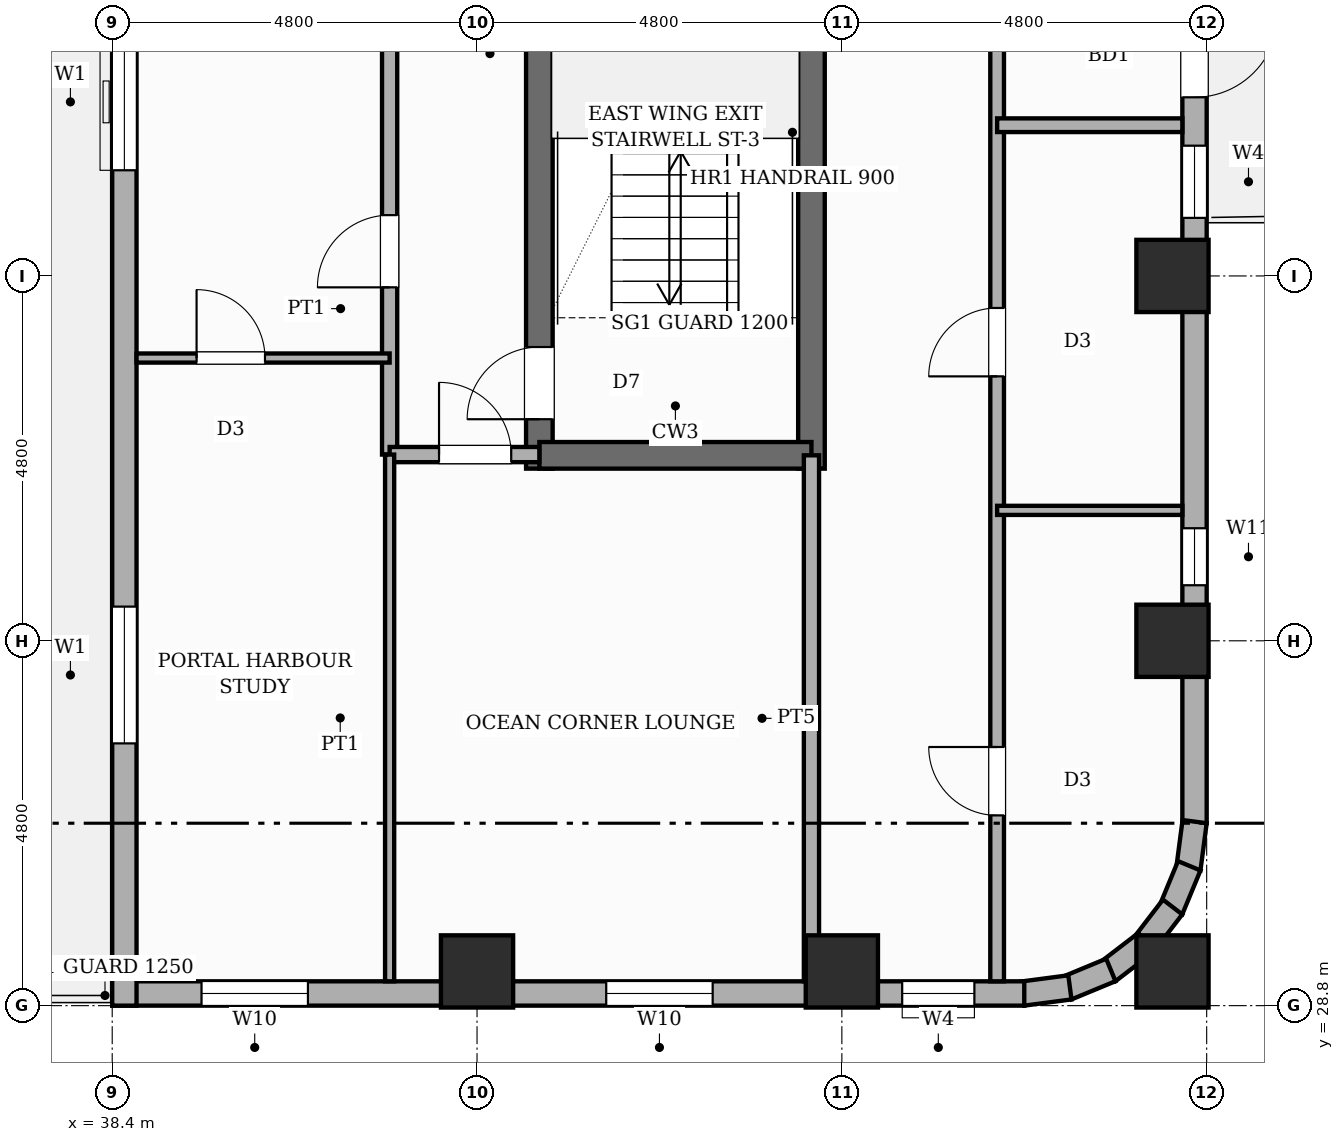
"""IFC4 building model, lengths in metres.
Left out: names, types, materials, properties, quantities, classifications, styles, units other than length and angle.
Written with IfcOpenShell. Run it as: python <this file> out.ifc"""

import sys

from ifc_helpers import new_model, si_unit, direction, frame, frame_2d, origin, origin_2d, place, context, subcontext, project, spatial, rectangle, extrude, element, fill, save


model = new_model("IFC4")
c1 = context("Model", 3, precision=1e-05, world=origin(), true_north=direction((0.0, 1.0)))
c2 = subcontext(c1, "Body", "Model", "MODEL_VIEW")
j1 = project(units=[si_unit("LENGTHUNIT", "METRE"), si_unit("PLANEANGLEUNIT", "RADIAN")], contexts=[c1])
p1 = place(None, origin())
s1 = spatial("IfcSite", under=j1, at=p1, CompositionType="ELEMENT")
p2 = place(p1, origin())
s2 = spatial("IfcBuilding", under=s1, at=p2, CompositionType="ELEMENT")
p3 = place(p2, frame((0.0, 0.0, 154.0)))
s3 = spatial("IfcBuildingStorey", under=s2, at=p3, CompositionType="ELEMENT", Elevation=154.0)
p4 = place(p3, frame((44.02, 35.865, 0.0), z_axis=(0.0, 0.0, 1.0), x_axis=(0.0, 1.0, 0.0)))
e1 = element("IfcWall", 1, at=p4, inside=s3, PredefinedType="SHEAR", context=c2, shape_type="SweptSolid", body=[
    extrude(rectangle(XDim=8.97, YDim=0.35, at=frame_2d((4.485, 0.0))), origin(), (0.0, 0.0, 1.0), 3.6),
])
p5 = place(p4, frame((0.65, 0.0, 0.0)))
e2 = element("IfcOpeningElement", 2, at=p5, cuts=e1, PredefinedType="OPENING", context=c2, shape_type="SweptSolid", body=[
    extrude(rectangle(XDim=0.95, YDim=2.1, at=frame_2d((0.475, 1.05))), frame((0.0, 0.185, 0.0), z_axis=(0.0, -1.0, 0.0), x_axis=(1.0, 0.0, 0.0)), (0.0, 0.0, 1.0), 0.37),
])
p6 = place(p3, frame((47.6, 35.865, 0.0), z_axis=(0.0, 0.0, 1.0), x_axis=(0.0, 1.0, 0.0)))
e3 = element("IfcWall", 3, at=p6, inside=s3, PredefinedType="SHEAR", context=c2, shape_type="SweptSolid", body=[
    extrude(rectangle(XDim=8.97, YDim=0.35, at=frame_2d((4.485, 0.0))), origin(), (0.0, 0.0, 1.0), 3.6),
])
p7 = place(p3, frame((44.02, 36.04, 0.0), z_axis=(0.0, 0.0, 1.0), x_axis=(1.0, 0.0, 0.0)))
e4 = element("IfcWall", 4, at=p7, inside=s3, PredefinedType="SHEAR", context=c2, shape_type="SweptSolid", body=[
    extrude(rectangle(XDim=3.58, YDim=0.35, at=frame_2d((1.79, 0.0))), origin(), (0.0, 0.0, 1.0), 3.6),
])
for number, where, z_axis, x_axis in (
    (5, (43.2, 29.25, 0.0), (0.0, 0.0, 1.0), (1.0, 0.0, 0.0)),
    (6, (48.0, 29.25, 0.0), (0.0, 0.0, 1.0), (1.0, 0.0, 0.0)),
    (7, (52.35, 29.25, 0.0), (0.0, 0.0, 1.0), (1.0, 0.0, 0.0)),
    (8, (52.35, 33.6, 0.0), (0.0, 0.0, 1.0), (1.0, 0.0, 0.0)),
    (9, (52.35, 38.4, 0.0), (0.0, 0.0, 1.0), (1.0, 0.0, 0.0)),
):
    element("IfcColumn", number, at=place(p3, frame(where, z_axis=z_axis, x_axis=x_axis)), inside=s3, PredefinedType="COLUMN", context=c2, shape_type="SweptSolid", body=[
        extrude(rectangle(XDim=0.95, YDim=0.95, at=origin_2d()), origin(), (0.0, 0.0, 1.0), 3.6),
    ])
p8 = place(p3, frame((52.64, 45.6, 0.0), z_axis=(0.0, 0.0, 1.0), x_axis=(0.0, -1.0, 0.0)))
e10 = element("IfcWall", 10, at=p8, inside=s3, PredefinedType="STANDARD", context=c2, shape_type="SweptSolid", body=[
    extrude(rectangle(XDim=14.4, YDim=0.32, at=frame_2d((7.2, 0.0))), origin(), (0.0, 0.0, 1.0), 2.54),
])
p9 = place(p8, frame((3.75, 0.0, 0.0)))
e11 = element("IfcOpeningElement", 11, at=p9, cuts=e10, PredefinedType="OPENING", context=c2, shape_type="SweptSolid", body=[
    extrude(rectangle(XDim=1.1, YDim=2.15, at=frame_2d((0.55, 1.075))), frame((0.0, 0.17, 0.0), z_axis=(0.0, -1.0, 0.0), x_axis=(1.0, 0.0, 0.0)), (0.0, 0.0, 1.0), 0.34),
])
p10 = place(p8, frame((10.52, 0.0, 0.45)))
e12 = element("IfcOpeningElement", 12, at=p10, cuts=e10, PredefinedType="OPENING", context=c2, shape_type="SweptSolid", body=[
    extrude(rectangle(XDim=0.75, YDim=1.8, at=frame_2d((0.375, 0.9))), frame((0.0, 0.17, 0.0), z_axis=(0.0, -1.0, 0.0), x_axis=(1.0, 0.0, 0.0)), (0.0, 0.0, 1.0), 0.34),
])
p11 = place(p8, frame((5.486, 0.0, 0.45)))
e13 = element("IfcOpeningElement", 13, at=p11, cuts=e10, PredefinedType="OPENING", context=c2, shape_type="SweptSolid", body=[
    extrude(rectangle(XDim=0.95, YDim=1.8, at=frame_2d((0.475, 0.9))), frame((0.0, 0.17, 0.0), z_axis=(0.0, -1.0, 0.0), x_axis=(1.0, 0.0, 0.0)), (0.0, 0.0, 1.0), 0.34),
])
p12 = place(p3, frame((52.641, 31.221, 0.0), z_axis=(0.0, 0.0, 1.0), x_axis=(-0.130504898859, -0.991447664465, 0.0)))
e14 = element("IfcWall", 14, at=p12, inside=s3, PredefinedType="STANDARD", context=c2, shape_type="SweptSolid", body=[
    extrude(rectangle(XDim=0.627, YDim=0.32, at=frame_2d((0.313, 0.0))), origin(), (0.0, 0.0, 1.0), 2.54),
])
p13 = place(p3, frame((52.57, 30.64, 0.0), z_axis=(0.0, 0.0, 1.0), x_axis=(-0.382455093999, -0.923974080304, 0.0)))
e15 = element("IfcWall", 15, at=p13, inside=s3, PredefinedType="STANDARD", context=c2, shape_type="SweptSolid", body=[
    extrude(rectangle(XDim=0.626, YDim=0.32, at=frame_2d((0.313, 0.0))), origin(), (0.0, 0.0, 1.0), 2.54),
])
p14 = place(p3, frame((52.352, 30.097, 0.0), z_axis=(0.0, 0.0, 1.0), x_axis=(-0.608693302629, -0.793405610854, 0.0)))
e16 = element("IfcWall", 16, at=p14, inside=s3, PredefinedType="STANDARD", context=c2, shape_type="SweptSolid", body=[
    extrude(rectangle(XDim=0.626, YDim=0.32, at=frame_2d((0.313, 0.0))), origin(), (0.0, 0.0, 1.0), 2.54),
])
p15 = place(p3, frame((52.0, 29.63, 0.0), z_axis=(0.0, 0.0, 1.0), x_axis=(-0.7932174212, -0.608938521285, 0.0)))
e17 = element("IfcWall", 17, at=p15, inside=s3, PredefinedType="STANDARD", context=c2, shape_type="SweptSolid", body=[
    extrude(rectangle(XDim=0.627, YDim=0.32, at=frame_2d((0.313, 0.0))), origin(), (0.0, 0.0, 1.0), 2.54),
])
for number, where, z_axis, x_axis in (
    (18, (51.539, 29.269, 0.0), (0.0, 0.0, 1.0), (-0.924, -0.383, 0.0)),
    (19, (51.0, 29.04, 0.0), (0.0, 0.0, 1.0), (-0.991, -0.131, 0.0)),
):
    element("IfcWall", number, at=place(p3, frame(where, z_axis=z_axis, x_axis=x_axis)), inside=s3, PredefinedType="STANDARD", context=c2, shape_type="SweptSolid", body=[
        extrude(rectangle(XDim=0.626, YDim=0.32, at=frame_2d((0.313, 0.0))), origin(), (0.0, 0.0, 1.0), 2.54),
    ])
p16 = place(p3, frame((50.4, 28.96, 0.0), z_axis=(0.0, 0.0, 1.0), x_axis=(-1.0, 0.0, 0.0)))
e20 = element("IfcWall", 20, at=p16, inside=s3, PredefinedType="STANDARD", context=c2, shape_type="SweptSolid", body=[
    extrude(rectangle(XDim=12.0, YDim=0.32, at=frame_2d((6.0, 0.0))), origin(), (0.0, 0.0, 1.0), 2.54),
])
p17 = place(p16, frame((0.656, 0.0, 0.45)))
e21 = element("IfcOpeningElement", 21, at=p17, cuts=e20, PredefinedType="OPENING", context=c2, shape_type="SweptSolid", body=[
    extrude(rectangle(XDim=0.95, YDim=1.8, at=frame_2d((0.475, 0.9))), frame((0.0, 0.17, 0.0), z_axis=(0.0, -1.0, 0.0), x_axis=(1.0, 0.0, 0.0)), (0.0, 0.0, 1.0), 0.34),
])
p18 = place(p16, frame((9.425, 0.0, 0.65)))
e22 = element("IfcOpeningElement", 22, at=p18, cuts=e20, PredefinedType="OPENING", context=c2, shape_type="SweptSolid", body=[
    extrude(rectangle(XDim=1.4, YDim=1.1, at=frame_2d((0.7, 0.55))), frame((0.0, 0.17, 0.0), z_axis=(0.0, -1.0, 0.0), x_axis=(1.0, 0.0, 0.0)), (0.0, 0.0, 1.0), 0.34),
])
p19 = place(p16, frame((4.1, 0.0, 0.65)))
e23 = element("IfcOpeningElement", 23, at=p19, cuts=e20, PredefinedType="OPENING", context=c2, shape_type="SweptSolid", body=[
    extrude(rectangle(XDim=1.4, YDim=1.1, at=frame_2d((0.7, 0.55))), frame((0.0, 0.17, 0.0), z_axis=(0.0, -1.0, 0.0), x_axis=(1.0, 0.0, 0.0)), (0.0, 0.0, 1.0), 0.34),
])
p20 = place(p3, frame((38.56, 28.8, 0.0), z_axis=(0.0, 0.0, 1.0), x_axis=(0.0, 1.0, 0.0)))
e24 = element("IfcWall", 24, at=p20, inside=s3, PredefinedType="STANDARD", context=c2, shape_type="SweptSolid", body=[
    extrude(rectangle(XDim=15.32, YDim=0.32, at=frame_2d((7.66, 0.0))), origin(), (0.0, 0.0, 1.0), 3.36),
])
p21 = place(p20, frame((10.99, 0.0, 0.8)))
e25 = element("IfcOpeningElement", 25, at=p21, cuts=e24, PredefinedType="OPENING", context=c2, shape_type="SweptSolid", body=[
    extrude(rectangle(XDim=1.8, YDim=2.1, at=frame_2d((0.9, 1.05))), frame((0.0, 0.17, 0.0), z_axis=(0.0, -1.0, 0.0), x_axis=(1.0, 0.0, 0.0)), (0.0, 0.0, 1.0), 0.34),
])
p22 = place(p20, frame((3.45, 0.0, 0.8)))
e26 = element("IfcOpeningElement", 26, at=p22, cuts=e24, PredefinedType="OPENING", context=c2, shape_type="SweptSolid", body=[
    extrude(rectangle(XDim=1.8, YDim=2.1, at=frame_2d((0.9, 1.05))), frame((0.0, 0.17, 0.0), z_axis=(0.0, -1.0, 0.0), x_axis=(1.0, 0.0, 0.0)), (0.0, 0.0, 1.0), 0.34),
])
p23 = place(p3, frame((42.05, 36.05, 0.0), z_axis=(0.0, 0.0, 1.0), x_axis=(0.0, 1.0, 0.0)))
e27 = element("IfcWall", 27, at=p23, inside=s3, PredefinedType="PARTITIONING", context=c2, shape_type="SweptSolid", body=[
    extrude(rectangle(XDim=8.75, YDim=0.2, at=frame_2d((4.375, 0.0))), origin(), (0.0, 0.0, 1.0), 3.36),
])
p24 = place(p23, frame((2.2, 0.0, 0.0)))
e28 = element("IfcOpeningElement", 28, at=p24, cuts=e27, PredefinedType="OPENING", context=c2, shape_type="SweptSolid", body=[
    extrude(rectangle(XDim=0.95, YDim=2.15, at=frame_2d((0.475, 1.075))), frame((0.0, 0.11, 0.0), z_axis=(0.0, -1.0, 0.0), x_axis=(1.0, 0.0, 0.0)), (0.0, 0.0, 1.0), 0.22),
])
p25 = place(p3, frame((42.05, 36.05, 0.0), z_axis=(0.0, 0.0, 1.0), x_axis=(1.0, 0.0, 0.0)))
e29 = element("IfcWall", 29, at=p25, inside=s3, PredefinedType="PARTITIONING", context=c2, shape_type="SweptSolid", body=[
    extrude(rectangle(XDim=1.97, YDim=0.2, at=frame_2d((0.985, 0.0))), origin(), (0.0, 0.0, 1.0), 3.36),
])
p26 = place(p25, frame((0.65, 0.0, 0.0)))
e30 = element("IfcOpeningElement", 30, at=p26, cuts=e29, PredefinedType="OPENING", context=c2, shape_type="SweptSolid", body=[
    extrude(rectangle(XDim=0.95, YDim=2.15, at=frame_2d((0.475, 1.075))), frame((0.0, 0.11, 0.0), z_axis=(0.0, -1.0, 0.0), x_axis=(1.0, 0.0, 0.0)), (0.0, 0.0, 1.0), 0.22),
])
p27 = place(p3, frame((38.72, 37.32, 0.0), z_axis=(0.0, 0.0, 1.0), x_axis=(1.0, 0.0, 0.0)))
e31 = element("IfcWall", 31, at=p27, inside=s3, PredefinedType="PARTITIONING", context=c2, shape_type="SweptSolid", body=[
    extrude(rectangle(XDim=3.33, YDim=0.12, at=frame_2d((1.665, 0.0))), origin(), (0.0, 0.0, 1.0), 3.36),
])
p28 = place(p27, frame((0.79, 0.0, 0.0)))
e32 = element("IfcOpeningElement", 32, at=p28, cuts=e31, PredefinedType="OPENING", context=c2, shape_type="SweptSolid", body=[
    extrude(rectangle(XDim=0.9, YDim=2.15, at=frame_2d((0.45, 1.075))), frame((0.0, 0.07, 0.0), z_axis=(0.0, -1.0, 0.0), x_axis=(1.0, 0.0, 0.0)), (0.0, 0.0, 1.0), 0.14),
])
p29 = place(p3, frame((42.05, 29.12, 0.0), z_axis=(0.0, 0.0, 1.0), x_axis=(0.0, 1.0, 0.0)))
e33 = element("IfcWall", 33, at=p29, inside=s3, PredefinedType="PARTITIONING", context=c2, shape_type="SweptSolid", body=[
    extrude(rectangle(XDim=6.93, YDim=0.12, at=frame_2d((3.465, 0.0))), origin(), (0.0, 0.0, 1.0), 3.36),
])
p30 = place(p3, frame((47.6, 29.12, 0.0), z_axis=(0.0, 0.0, 1.0), x_axis=(0.0, 1.0, 0.0)))
e34 = element("IfcWall", 34, at=p30, inside=s3, PredefinedType="SOLIDWALL", context=c2, shape_type="SweptSolid", body=[
    extrude(rectangle(XDim=6.92, YDim=0.2, at=frame_2d((3.46, 0.0))), origin(), (0.0, 0.0, 1.0), 3.36),
])
p31 = place(p3, frame((50.043, 29.12, 0.0), z_axis=(0.0, 0.0, 1.0), x_axis=(0.0, 1.0, 0.0)))
e35 = element("IfcWall", 35, at=p31, inside=s3, PredefinedType="PLUMBINGWALL", context=c2, shape_type="SweptSolid", body=[
    extrude(rectangle(XDim=15.58, YDim=0.18, at=frame_2d((7.79, 0.0))), origin(), (0.0, 0.0, 1.0), 3.36),
])
p32 = place(p31, frame((2.183, 0.0, 0.0)))
e36 = element("IfcOpeningElement", 36, at=p32, cuts=e35, PredefinedType="OPENING", context=c2, shape_type="SweptSolid", body=[
    extrude(rectangle(XDim=0.9, YDim=2.15, at=frame_2d((0.45, 1.075))), frame((0.0, 0.1, 0.0), z_axis=(0.0, -1.0, 0.0), x_axis=(1.0, 0.0, 0.0)), (0.0, 0.0, 1.0), 0.2),
])
p33 = place(p31, frame((7.959, 0.0, 0.0)))
e37 = element("IfcOpeningElement", 37, at=p33, cuts=e35, PredefinedType="OPENING", context=c2, shape_type="SweptSolid", body=[
    extrude(rectangle(XDim=0.9, YDim=2.15, at=frame_2d((0.45, 1.075))), frame((0.0, 0.1, 0.0), z_axis=(0.0, -1.0, 0.0), x_axis=(1.0, 0.0, 0.0)), (0.0, 0.0, 1.0), 0.2),
])
p34 = place(p31, frame((12.711, 0.0, 0.0)))
e38 = element("IfcOpeningElement", 38, at=p34, cuts=e35, PredefinedType="OPENING", context=c2, shape_type="SweptSolid", body=[
    extrude(rectangle(XDim=0.86, YDim=2.1, at=frame_2d((0.43, 1.05))), frame((0.0, 0.1, 0.0), z_axis=(0.0, -1.0, 0.0), x_axis=(1.0, 0.0, 0.0)), (0.0, 0.0, 1.0), 0.2),
])
p35 = place(p3, frame((50.043, 35.316, 0.0), z_axis=(0.0, 0.0, 1.0), x_axis=(1.0, 0.0, 0.0)))
e39 = element("IfcWall", 39, at=p35, inside=s3, PredefinedType="PARTITIONING", context=c2, shape_type="SweptSolid", body=[
    extrude(rectangle(XDim=2.437, YDim=0.12, at=frame_2d((1.219, 0.0))), origin(), (0.0, 0.0, 1.0), 3.36),
])
p36 = place(p3, frame((50.043, 40.383, 0.0), z_axis=(0.0, 0.0, 1.0), x_axis=(1.0, 0.0, 0.0)))
e40 = element("IfcWall", 40, at=p36, inside=s3, PredefinedType="PLUMBINGWALL", context=c2, shape_type="SweptSolid", body=[
    extrude(rectangle(XDim=2.437, YDim=0.18, at=frame_2d((1.219, 0.0))), origin(), (0.0, 0.0, 1.0), 3.36),
])
p37 = place(p9, origin())
e41 = element("IfcDoor", 41, at=p37, inside=s3, OperationType="SINGLE_SWING_LEFT", PredefinedType="DOOR", context=c2, shape_type="SweptSolid", body=[
    extrude(rectangle(XDim=1.1, YDim=2.15, at=frame_2d((0.55, 1.075))), frame((0.0, 0.025, 0.0), z_axis=(0.0, -1.0, 0.0), x_axis=(1.0, 0.0, 0.0)), (0.0, 0.0, 1.0), 0.05),
])
fill(e11, e41)
p38 = place(p10, origin())
e42 = element("IfcWindow", 42, at=p38, inside=s3, PartitioningType="SINGLE_PANEL", PredefinedType="WINDOW", context=c2, shape_type="SweptSolid", body=[
    extrude(rectangle(XDim=0.75, YDim=1.8, at=frame_2d((0.375, 0.9))), frame((0.0, 0.03, 0.0), z_axis=(0.0, -1.0, 0.0), x_axis=(1.0, 0.0, 0.0)), (0.0, 0.0, 1.0), 0.06),
])
fill(e12, e42)
p39 = place(p11, origin())
e43 = element("IfcWindow", 43, at=p39, inside=s3, PartitioningType="SINGLE_PANEL", PredefinedType="WINDOW", context=c2, shape_type="SweptSolid", body=[
    extrude(rectangle(XDim=0.95, YDim=1.8, at=frame_2d((0.475, 0.9))), frame((0.0, 0.03, 0.0), z_axis=(0.0, -1.0, 0.0), x_axis=(1.0, 0.0, 0.0)), (0.0, 0.0, 1.0), 0.06),
])
fill(e13, e43)
p40 = place(p17, origin())
e44 = element("IfcWindow", 44, at=p40, inside=s3, PartitioningType="SINGLE_PANEL", PredefinedType="WINDOW", context=c2, shape_type="SweptSolid", body=[
    extrude(rectangle(XDim=0.95, YDim=1.8, at=frame_2d((0.475, 0.9))), frame((0.0, 0.03, 0.0), z_axis=(0.0, -1.0, 0.0), x_axis=(1.0, 0.0, 0.0)), (0.0, 0.0, 1.0), 0.06),
])
fill(e21, e44)
p41 = place(p18, origin())
e45 = element("IfcWindow", 45, at=p41, inside=s3, PartitioningType="SINGLE_PANEL", PredefinedType="WINDOW", context=c2, shape_type="SweptSolid", body=[
    extrude(rectangle(XDim=1.4, YDim=1.1, at=frame_2d((0.7, 0.55))), frame((0.0, 0.03, 0.0), z_axis=(0.0, -1.0, 0.0), x_axis=(1.0, 0.0, 0.0)), (0.0, 0.0, 1.0), 0.06),
])
fill(e22, e45)
p42 = place(p19, origin())
e46 = element("IfcWindow", 46, at=p42, inside=s3, PartitioningType="SINGLE_PANEL", PredefinedType="WINDOW", context=c2, shape_type="SweptSolid", body=[
    extrude(rectangle(XDim=1.4, YDim=1.1, at=frame_2d((0.7, 0.55))), frame((0.0, 0.03, 0.0), z_axis=(0.0, -1.0, 0.0), x_axis=(1.0, 0.0, 0.0)), (0.0, 0.0, 1.0), 0.06),
])
fill(e23, e46)
p43 = place(p21, origin())
e47 = element("IfcWindow", 47, at=p43, inside=s3, PartitioningType="SINGLE_PANEL", PredefinedType="WINDOW", context=c2, shape_type="SweptSolid", body=[
    extrude(rectangle(XDim=1.8, YDim=2.1, at=frame_2d((0.9, 1.05))), frame((0.0, 0.03, 0.0), z_axis=(0.0, -1.0, 0.0), x_axis=(1.0, 0.0, 0.0)), (0.0, 0.0, 1.0), 0.06),
])
fill(e25, e47)
p44 = place(p22, origin())
e48 = element("IfcWindow", 48, at=p44, inside=s3, PartitioningType="SINGLE_PANEL", PredefinedType="WINDOW", context=c2, shape_type="SweptSolid", body=[
    extrude(rectangle(XDim=1.8, YDim=2.1, at=frame_2d((0.9, 1.05))), frame((0.0, 0.03, 0.0), z_axis=(0.0, -1.0, 0.0), x_axis=(1.0, 0.0, 0.0)), (0.0, 0.0, 1.0), 0.06),
])
fill(e26, e48)
p45 = place(p5, origin())
e49 = element("IfcDoor", 49, at=p45, inside=s3, OperationType="SINGLE_SWING_LEFT", PredefinedType="DOOR", context=c2, shape_type="SweptSolid", body=[
    extrude(rectangle(XDim=0.95, YDim=2.1, at=frame_2d((0.475, 1.05))), frame((0.0, 0.025, 0.0), z_axis=(0.0, -1.0, 0.0), x_axis=(1.0, 0.0, 0.0)), (0.0, 0.0, 1.0), 0.05),
])
fill(e2, e49)
p46 = place(p24, origin())
e50 = element("IfcDoor", 50, at=p46, inside=s3, OperationType="SINGLE_SWING_LEFT", PredefinedType="DOOR", context=c2, shape_type="SweptSolid", body=[
    extrude(rectangle(XDim=0.95, YDim=2.15, at=frame_2d((0.475, 1.075))), frame((0.0, 0.025, 0.0), z_axis=(0.0, -1.0, 0.0), x_axis=(1.0, 0.0, 0.0)), (0.0, 0.0, 1.0), 0.05),
])
fill(e28, e50)
p47 = place(p28, origin())
e51 = element("IfcDoor", 51, at=p47, inside=s3, OperationType="SINGLE_SWING_LEFT", PredefinedType="DOOR", context=c2, shape_type="SweptSolid", body=[
    extrude(rectangle(XDim=0.9, YDim=2.15, at=frame_2d((0.45, 1.075))), frame((0.0, 0.025, 0.0), z_axis=(0.0, -1.0, 0.0), x_axis=(1.0, 0.0, 0.0)), (0.0, 0.0, 1.0), 0.05),
])
fill(e32, e51)
p48 = place(p26, origin())
e52 = element("IfcDoor", 52, at=p48, inside=s3, OperationType="SINGLE_SWING_LEFT", PredefinedType="DOOR", context=c2, shape_type="SweptSolid", body=[
    extrude(rectangle(XDim=0.95, YDim=2.15, at=frame_2d((0.475, 1.075))), frame((0.0, 0.025, 0.0), z_axis=(0.0, -1.0, 0.0), x_axis=(1.0, 0.0, 0.0)), (0.0, 0.0, 1.0), 0.05),
])
fill(e30, e52)
p49 = place(p32, origin())
e53 = element("IfcDoor", 53, at=p49, inside=s3, OperationType="SINGLE_SWING_RIGHT", PredefinedType="DOOR", context=c2, shape_type="SweptSolid", body=[
    extrude(rectangle(XDim=0.9, YDim=2.15, at=frame_2d((0.45, 1.075))), frame((0.0, 0.025, 0.0), z_axis=(0.0, -1.0, 0.0), x_axis=(1.0, 0.0, 0.0)), (0.0, 0.0, 1.0), 0.05),
])
fill(e36, e53)
p50 = place(p33, origin())
e54 = element("IfcDoor", 54, at=p50, inside=s3, OperationType="SINGLE_SWING_LEFT", PredefinedType="DOOR", context=c2, shape_type="SweptSolid", body=[
    extrude(rectangle(XDim=0.9, YDim=2.15, at=frame_2d((0.45, 1.075))), frame((0.0, 0.025, 0.0), z_axis=(0.0, -1.0, 0.0), x_axis=(1.0, 0.0, 0.0)), (0.0, 0.0, 1.0), 0.05),
])
fill(e37, e54)
save(model, sys.argv[1])
